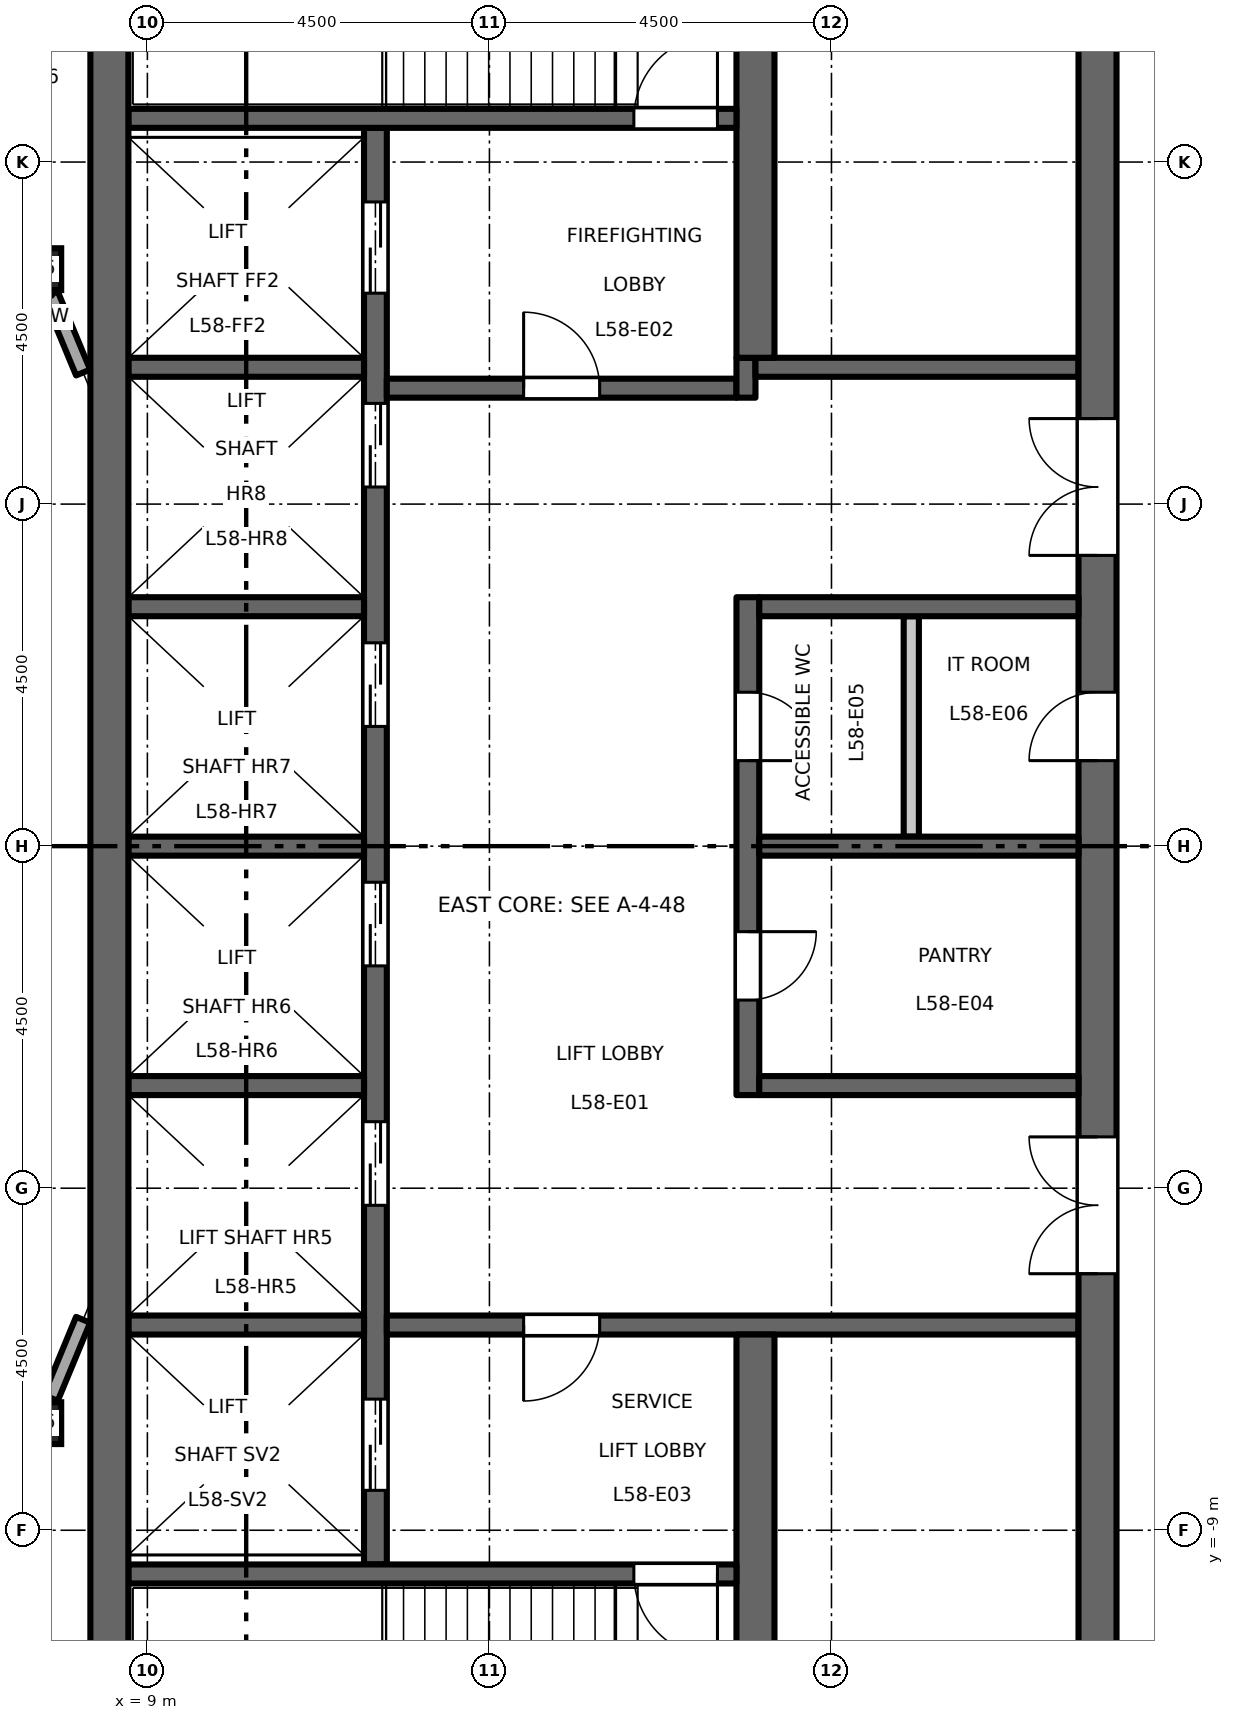
"""IFC4 building model, lengths in metres.
Left out: names, types, materials, properties, quantities, classifications, styles, units other than length and angle.
Written with IfcOpenShell. Run it as: python <this file> out.ifc"""

import sys

from ifc_helpers import new_model, si_unit, direction, frame, frame_2d, origin, origin_2d, place, context, subcontext, project, spatial, rectangle, hollow_rectangle, extrude, element, fill, save


model = new_model("IFC4")
c1 = context("Model", 3, precision=1e-05, world=origin(), true_north=direction((0.0, 1.0)))
c2 = subcontext(c1, "Body", "Model", "MODEL_VIEW")
j1 = project(units=[si_unit("LENGTHUNIT", "METRE"), si_unit("PLANEANGLEUNIT", "RADIAN")], contexts=[c1])
p1 = place(None, origin())
s1 = spatial("IfcSite", under=j1, at=p1, CompositionType="ELEMENT")
p2 = place(p1, origin())
s2 = spatial("IfcBuilding", under=s1, at=p2, CompositionType="ELEMENT")
p3 = place(p2, frame((0.0, 0.0, 269.2)))
s3 = spatial("IfcBuildingStorey", under=s2, at=p3, CompositionType="ELEMENT", Elevation=269.2)
for number, where, z_axis, x_axis in (
    (1, (7.591, -7.591, 0.0), (0.0, 0.0, 1.0), (1.0, 0.0, 0.0)),
    (2, (7.591, 7.591, 0.0), (0.0, 0.0, 1.0), (1.0, 0.0, 0.0)),
):
    element("IfcColumn", number, at=place(p3, frame(where, z_axis=z_axis, x_axis=x_axis)), inside=s3, PredefinedType="COLUMN", context=c2, shape_type="SweptSolid", body=[
        extrude(hollow_rectangle(XDim=0.55, YDim=0.55, WallThickness=0.028, at=origin_2d()), origin(), (0.0, 0.0, 1.0), 4.5),
    ])
p4 = place(p3, frame((12.0, -9.45, 0.0), z_axis=(0.0, 0.0, 1.0), x_axis=(0.0, 1.0, 0.0)))
e3 = element("IfcWall", 3, at=p4, inside=s3, PredefinedType="SHEAR", context=c2, shape_type="SweptSolid", body=[
    extrude(rectangle(XDim=18.9, YDim=0.3, at=frame_2d((9.45, 0.0))), origin(), (0.0, 0.0, 1.0), 4.35),
])
p5 = place(p4, frame((4.725, 0.0, 0.0)))
e4 = element("IfcOpeningElement", 4, at=p5, cuts=e3, PredefinedType="OPENING", context=c2, shape_type="SweptSolid", body=[
    extrude(rectangle(XDim=1.1, YDim=2.1, at=frame_2d((0.55, 1.05))), frame((0.0, 0.16, 0.0), z_axis=(0.0, -1.0, 0.0), x_axis=(1.0, 0.0, 0.0)), (0.0, 0.0, 1.0), 0.32),
])
p6 = place(p4, frame((7.875, 0.0, 0.0)))
e5 = element("IfcOpeningElement", 5, at=p6, cuts=e3, PredefinedType="OPENING", context=c2, shape_type="SweptSolid", body=[
    extrude(rectangle(XDim=1.1, YDim=2.1, at=frame_2d((0.55, 1.05))), frame((0.0, 0.16, 0.0), z_axis=(0.0, -1.0, 0.0), x_axis=(1.0, 0.0, 0.0)), (0.0, 0.0, 1.0), 0.32),
])
p7 = place(p4, frame((11.025, 0.0, 0.0)))
e6 = element("IfcOpeningElement", 6, at=p7, cuts=e3, PredefinedType="OPENING", context=c2, shape_type="SweptSolid", body=[
    extrude(rectangle(XDim=1.1, YDim=2.1, at=frame_2d((0.55, 1.05))), frame((0.0, 0.16, 0.0), z_axis=(0.0, -1.0, 0.0), x_axis=(1.0, 0.0, 0.0)), (0.0, 0.0, 1.0), 0.32),
])
p8 = place(p4, frame((14.175, 0.0, 0.0)))
e7 = element("IfcOpeningElement", 7, at=p8, cuts=e3, PredefinedType="OPENING", context=c2, shape_type="SweptSolid", body=[
    extrude(rectangle(XDim=1.1, YDim=2.1, at=frame_2d((0.55, 1.05))), frame((0.0, 0.16, 0.0), z_axis=(0.0, -1.0, 0.0), x_axis=(1.0, 0.0, 0.0)), (0.0, 0.0, 1.0), 0.32),
])
p9 = place(p4, frame((16.725, 0.0, 0.0)))
e8 = element("IfcOpeningElement", 8, at=p9, cuts=e3, PredefinedType="OPENING", context=c2, shape_type="SweptSolid", body=[
    extrude(rectangle(XDim=1.2, YDim=2.1, at=frame_2d((0.6, 1.05))), frame((0.0, 0.16, 0.0), z_axis=(0.0, -1.0, 0.0), x_axis=(1.0, 0.0, 0.0)), (0.0, 0.0, 1.0), 0.32),
])
p10 = place(p4, frame((0.975, 0.0, 0.0)))
e9 = element("IfcOpeningElement", 9, at=p10, cuts=e3, PredefinedType="OPENING", context=c2, shape_type="SweptSolid", body=[
    extrude(rectangle(XDim=1.2, YDim=2.1, at=frame_2d((0.6, 1.05))), frame((0.0, 0.16, 0.0), z_axis=(0.0, -1.0, 0.0), x_axis=(1.0, 0.0, 0.0)), (0.0, 0.0, 1.0), 0.32),
])
p11 = place(p3, frame((12.15, 6.025, 0.0), z_axis=(0.0, 0.0, 1.0), x_axis=(1.0, 0.0, 0.0)))
e10 = element("IfcWall", 10, at=p11, inside=s3, PredefinedType="SHEAR", context=c2, shape_type="SweptSolid", body=[
    extrude(rectangle(XDim=4.6, YDim=0.25, at=frame_2d((2.3, 0.0))), origin(), (0.0, 0.0, 1.0), 4.35),
])
p12 = place(p11, frame((1.8, 0.0, 0.0)))
e11 = element("IfcOpeningElement", 11, at=p12, cuts=e10, PredefinedType="OPENING", context=c2, shape_type="SweptSolid", body=[
    extrude(rectangle(XDim=1.0, YDim=2.1, at=frame_2d((0.5, 1.05))), frame((0.0, 0.135, 0.0), z_axis=(0.0, -1.0, 0.0), x_axis=(1.0, 0.0, 0.0)), (0.0, 0.0, 1.0), 0.27),
])
p13 = place(p3, frame((16.875, 5.9, 0.0), z_axis=(0.0, 0.0, 1.0), x_axis=(0.0, 1.0, 0.0)))
e12 = element("IfcWall", 12, at=p13, inside=s3, PredefinedType="SHEAR", context=c2, shape_type="SweptSolid", body=[
    extrude(rectangle(XDim=0.525, YDim=0.25, at=frame_2d((0.263, 0.0))), origin(), (0.0, 0.0, 1.0), 4.35),
])
p14 = place(p3, frame((17.0, 6.3, 0.0), z_axis=(0.0, 0.0, 1.0), x_axis=(1.0, 0.0, 0.0)))
e13 = element("IfcWall", 13, at=p14, inside=s3, PredefinedType="SHEAR", context=c2, shape_type="SweptSolid", body=[
    extrude(rectangle(XDim=4.25, YDim=0.25, at=frame_2d((2.125, 0.0))), origin(), (0.0, 0.0, 1.0), 4.35),
])
p15 = place(p3, frame((12.15, -6.3, 0.0), z_axis=(0.0, 0.0, 1.0), x_axis=(1.0, 0.0, 0.0)))
e14 = element("IfcWall", 14, at=p15, inside=s3, PredefinedType="SHEAR", context=c2, shape_type="SweptSolid", body=[
    extrude(rectangle(XDim=9.1, YDim=0.25, at=frame_2d((4.55, 0.0))), origin(), (0.0, 0.0, 1.0), 4.35),
])
p16 = place(p15, frame((1.8, 0.0, 0.0)))
e15 = element("IfcOpeningElement", 15, at=p16, cuts=e14, PredefinedType="OPENING", context=c2, shape_type="SweptSolid", body=[
    extrude(rectangle(XDim=1.0, YDim=2.1, at=frame_2d((0.5, 1.05))), frame((0.0, 0.135, 0.0), z_axis=(0.0, -1.0, 0.0), x_axis=(1.0, 0.0, 0.0)), (0.0, 0.0, 1.0), 0.27),
])
p17 = place(p3, frame((21.5, -13.0, 0.0), z_axis=(0.0, 0.0, 1.0), x_axis=(0.0, 1.0, 0.0)))
e16 = element("IfcWall", 16, at=p17, inside=s3, PredefinedType="SHEAR", context=c2, shape_type="SweptSolid", body=[
    extrude(rectangle(XDim=26.0, YDim=0.5, at=frame_2d((13.0, 0.0))), origin(), (0.0, 0.0, 1.0), 4.35),
])
p18 = place(p17, frame((16.825, 0.0, 0.0)))
e17 = element("IfcOpeningElement", 17, at=p18, cuts=e16, PredefinedType="OPENING", context=c2, shape_type="SweptSolid", body=[
    extrude(rectangle(XDim=1.8, YDim=2.1, at=frame_2d((0.9, 1.05))), frame((0.0, 0.26, 0.0), z_axis=(0.0, -1.0, 0.0), x_axis=(1.0, 0.0, 0.0)), (0.0, 0.0, 1.0), 0.52),
])
p19 = place(p17, frame((7.375, 0.0, 0.0)))
e18 = element("IfcOpeningElement", 18, at=p19, cuts=e16, PredefinedType="OPENING", context=c2, shape_type="SweptSolid", body=[
    extrude(rectangle(XDim=1.8, YDim=2.1, at=frame_2d((0.9, 1.05))), frame((0.0, 0.26, 0.0), z_axis=(0.0, -1.0, 0.0), x_axis=(1.0, 0.0, 0.0)), (0.0, 0.0, 1.0), 0.52),
])
p20 = place(p17, frame((14.125, 0.0, 0.0)))
e19 = element("IfcOpeningElement", 19, at=p20, cuts=e16, PredefinedType="OPENING", context=c2, shape_type="SweptSolid", body=[
    extrude(rectangle(XDim=0.9, YDim=2.1, at=frame_2d((0.45, 1.05))), frame((0.0, 0.26, 0.0), z_axis=(0.0, -1.0, 0.0), x_axis=(1.0, 0.0, 0.0)), (0.0, 0.0, 1.0), 0.52),
])
p21 = place(p3, frame((16.9, -3.275, 0.0), z_axis=(0.0, 0.0, 1.0), x_axis=(0.0, 1.0, 0.0)))
e20 = element("IfcWall", 20, at=p21, inside=s3, PredefinedType="SHEAR", context=c2, shape_type="SweptSolid", body=[
    extrude(rectangle(XDim=6.55, YDim=0.3, at=frame_2d((3.275, 0.0))), origin(), (0.0, 0.0, 1.0), 4.35),
])
p22 = place(p21, frame((1.25, 0.0, 0.0)))
e21 = element("IfcOpeningElement", 21, at=p22, cuts=e20, PredefinedType="OPENING", context=c2, shape_type="SweptSolid", body=[
    extrude(rectangle(XDim=0.9, YDim=2.1, at=frame_2d((0.45, 1.05))), frame((0.0, 0.16, 0.0), z_axis=(0.0, -1.0, 0.0), x_axis=(1.0, 0.0, 0.0)), (0.0, 0.0, 1.0), 0.32),
])
p23 = place(p21, frame((4.4, 0.0, 0.0)))
e22 = element("IfcOpeningElement", 22, at=p23, cuts=e20, PredefinedType="OPENING", context=c2, shape_type="SweptSolid", body=[
    extrude(rectangle(XDim=0.9, YDim=2.1, at=frame_2d((0.45, 1.05))), frame((0.0, 0.16, 0.0), z_axis=(0.0, -1.0, 0.0), x_axis=(1.0, 0.0, 0.0)), (0.0, 0.0, 1.0), 0.32),
])
for number, where, z_axis, x_axis in (
    (23, (17.05, 0.0, 0.0), (0.0, 0.0, 1.0), (1.0, 0.0, 0.0)),
    (24, (17.05, 3.15, 0.0), (0.0, 0.0, 1.0), (1.0, 0.0, 0.0)),
    (25, (17.05, -3.15, 0.0), (0.0, 0.0, 1.0), (1.0, 0.0, 0.0)),
):
    element("IfcWall", number, at=place(p3, frame(where, z_axis=z_axis, x_axis=x_axis)), inside=s3, PredefinedType="SHEAR", context=c2, shape_type="SweptSolid", body=[
        extrude(rectangle(XDim=4.2, YDim=0.25, at=frame_2d((2.1, 0.0))), origin(), (0.0, 0.0, 1.0), 4.35),
    ])
p24 = place(p3, frame((19.05, 0.125, 0.0), z_axis=(0.0, 0.0, 1.0), x_axis=(0.0, 1.0, 0.0)))
e26 = element("IfcWall", 26, at=p24, inside=s3, PredefinedType="PARTITIONING", context=c2, shape_type="SweptSolid", body=[
    extrude(rectangle(XDim=2.9, YDim=0.2, at=frame_2d((1.45, 0.0))), origin(), (0.0, 0.0, 1.0), 4.35),
])
for number, where, z_axis, x_axis in (
    (27, (17.0, 6.425, 0.0), (0.0, 0.0, 1.0), (0.0, 1.0, 0.0)),
    (28, (17.0, -13.0, 0.0), (0.0, 0.0, 1.0), (0.0, 1.0, 0.0)),
):
    element("IfcWall", number, at=place(p3, frame(where, z_axis=z_axis, x_axis=x_axis)), inside=s3, PredefinedType="SHEAR", context=c2, shape_type="SweptSolid", body=[
        extrude(rectangle(XDim=6.575, YDim=0.5, at=frame_2d((3.288, 0.0))), origin(), (0.0, 0.0, 1.0), 4.35),
    ])
for number, where, z_axis, x_axis in (
    (29, (8.75, 0.0, 0.0), (0.0, 0.0, 1.0), (1.0, 0.0, 0.0)),
    (30, (8.75, 3.15, 0.0), (0.0, 0.0, 1.0), (1.0, 0.0, 0.0)),
    (31, (8.75, 6.3, 0.0), (0.0, 0.0, 1.0), (1.0, 0.0, 0.0)),
    (32, (8.75, -3.15, 0.0), (0.0, 0.0, 1.0), (1.0, 0.0, 0.0)),
    (33, (8.75, -6.3, 0.0), (0.0, 0.0, 1.0), (1.0, 0.0, 0.0)),
):
    element("IfcWall", number, at=place(p3, frame(where, z_axis=z_axis, x_axis=x_axis)), inside=s3, PredefinedType="SHEAR", context=c2, shape_type="SweptSolid", body=[
        extrude(rectangle(XDim=3.1, YDim=0.25, at=frame_2d((1.55, 0.0))), origin(), (0.0, 0.0, 1.0), 4.35),
    ])
p25 = place(p3, frame((8.75, 9.575, 0.0), z_axis=(0.0, 0.0, 1.0), x_axis=(1.0, 0.0, 0.0)))
e34 = element("IfcWall", 34, at=p25, inside=s3, PredefinedType="SHEAR", context=c2, shape_type="SweptSolid", body=[
    extrude(rectangle(XDim=8.0, YDim=0.25, at=frame_2d((4.0, 0.0))), origin(), (0.0, 0.0, 1.0), 4.35),
])
p26 = place(p25, frame((6.65, 0.0, 0.0)))
e35 = element("IfcOpeningElement", 35, at=p26, cuts=e34, PredefinedType="OPENING", context=c2, shape_type="SweptSolid", body=[
    extrude(rectangle(XDim=1.1, YDim=2.1, at=frame_2d((0.55, 1.05))), frame((0.0, 0.135, 0.0), z_axis=(0.0, -1.0, 0.0), x_axis=(1.0, 0.0, 0.0)), (0.0, 0.0, 1.0), 0.27),
])
p27 = place(p3, frame((8.75, -9.575, 0.0), z_axis=(0.0, 0.0, 1.0), x_axis=(1.0, 0.0, 0.0)))
e36 = element("IfcWall", 36, at=p27, inside=s3, PredefinedType="SHEAR", context=c2, shape_type="SweptSolid", body=[
    extrude(rectangle(XDim=8.0, YDim=0.25, at=frame_2d((4.0, 0.0))), origin(), (0.0, 0.0, 1.0), 4.35),
])
p28 = place(p27, frame((6.65, 0.0, 0.0)))
e37 = element("IfcOpeningElement", 37, at=p28, cuts=e36, PredefinedType="OPENING", context=c2, shape_type="SweptSolid", body=[
    extrude(rectangle(XDim=1.1, YDim=2.1, at=frame_2d((0.55, 1.05))), frame((0.0, 0.135, 0.0), z_axis=(0.0, -1.0, 0.0), x_axis=(1.0, 0.0, 0.0)), (0.0, 0.0, 1.0), 0.27),
])
p29 = place(p3, frame((8.5, -13.0, 0.0), z_axis=(0.0, 0.0, 1.0), x_axis=(0.0, 1.0, 0.0)))
e38 = element("IfcWall", 38, at=p29, inside=s3, PredefinedType="SHEAR", context=c2, shape_type="SweptSolid", body=[
    extrude(rectangle(XDim=26.0, YDim=0.5, at=frame_2d((13.0, 0.0))), origin(), (0.0, 0.0, 1.0), 4.35),
])
for number, where, z_axis, x_axis in (
    (39, (7.729, -7.259, 0.0), (0.0, 0.0, 1.0), (0.383, 0.924, 0.0)),
    (40, (8.154, 6.231, 0.0), (0.0, 0.0, 1.0), (-0.383, 0.924, 0.0)),
):
    element("IfcWall", number, at=place(p3, frame(where, z_axis=z_axis, x_axis=x_axis)), inside=s3, PredefinedType="STANDARD", context=c2, shape_type="SweptSolid", body=[
        extrude(rectangle(XDim=1.113, YDim=0.2, at=frame_2d((0.556, 0.0))), origin(), (0.0, 0.0, 1.0), 3.918),
    ])
p30 = place(p12, origin())
e41 = element("IfcDoor", 41, at=p30, inside=s3, OperationType="SINGLE_SWING_RIGHT", PredefinedType="DOOR", context=c2, shape_type="SweptSolid", body=[
    extrude(rectangle(XDim=1.0, YDim=2.1, at=frame_2d((0.5, 1.05))), frame((0.0, 0.025, 0.0), z_axis=(0.0, -1.0, 0.0), x_axis=(1.0, 0.0, 0.0)), (0.0, 0.0, 1.0), 0.05),
])
fill(e11, e41)
p31 = place(p16, origin())
e42 = element("IfcDoor", 42, at=p31, inside=s3, OperationType="SINGLE_SWING_LEFT", PredefinedType="DOOR", context=c2, shape_type="SweptSolid", body=[
    extrude(rectangle(XDim=1.0, YDim=2.1, at=frame_2d((0.5, 1.05))), frame((0.0, 0.025, 0.0), z_axis=(0.0, -1.0, 0.0), x_axis=(1.0, 0.0, 0.0)), (0.0, 0.0, 1.0), 0.05),
])
fill(e15, e42)
p32 = place(p26, origin())
e43 = element("IfcDoor", 43, at=p32, inside=s3, OperationType="SINGLE_SWING_LEFT", PredefinedType="DOOR", context=c2, shape_type="SweptSolid", body=[
    extrude(rectangle(XDim=1.1, YDim=2.1, at=frame_2d((0.55, 1.05))), frame((0.0, 0.025, 0.0), z_axis=(0.0, -1.0, 0.0), x_axis=(1.0, 0.0, 0.0)), (0.0, 0.0, 1.0), 0.05),
])
fill(e35, e43)
p33 = place(p28, origin())
e44 = element("IfcDoor", 44, at=p33, inside=s3, OperationType="SINGLE_SWING_RIGHT", PredefinedType="DOOR", context=c2, shape_type="SweptSolid", body=[
    extrude(rectangle(XDim=1.1, YDim=2.1, at=frame_2d((0.55, 1.05))), frame((0.0, 0.025, 0.0), z_axis=(0.0, -1.0, 0.0), x_axis=(1.0, 0.0, 0.0)), (0.0, 0.0, 1.0), 0.05),
])
fill(e37, e44)
p34 = place(p18, origin())
e45 = element("IfcDoor", 45, at=p34, inside=s3, OperationType="DOUBLE_DOOR_DOUBLE_SWING", PredefinedType="DOOR", context=c2, shape_type="SweptSolid", body=[
    extrude(rectangle(XDim=1.8, YDim=2.1, at=frame_2d((0.9, 1.05))), frame((0.0, 0.025, 0.0), z_axis=(0.0, -1.0, 0.0), x_axis=(1.0, 0.0, 0.0)), (0.0, 0.0, 1.0), 0.05),
])
fill(e17, e45)
p35 = place(p19, origin())
e46 = element("IfcDoor", 46, at=p35, inside=s3, OperationType="DOUBLE_DOOR_DOUBLE_SWING", PredefinedType="DOOR", context=c2, shape_type="SweptSolid", body=[
    extrude(rectangle(XDim=1.8, YDim=2.1, at=frame_2d((0.9, 1.05))), frame((0.0, 0.025, 0.0), z_axis=(0.0, -1.0, 0.0), x_axis=(1.0, 0.0, 0.0)), (0.0, 0.0, 1.0), 0.05),
])
fill(e18, e46)
p36 = place(p5, origin())
e47 = element("IfcDoor", 47, at=p36, inside=s3, OperationType="DOUBLE_DOOR_SLIDING", PredefinedType="DOOR", context=c2, shape_type="SweptSolid", body=[
    extrude(rectangle(XDim=1.1, YDim=2.1, at=frame_2d((0.55, 1.05))), frame((0.0, 0.025, 0.0), z_axis=(0.0, -1.0, 0.0), x_axis=(1.0, 0.0, 0.0)), (0.0, 0.0, 1.0), 0.05),
])
fill(e4, e47)
p37 = place(p6, origin())
e48 = element("IfcDoor", 48, at=p37, inside=s3, OperationType="DOUBLE_DOOR_SLIDING", PredefinedType="DOOR", context=c2, shape_type="SweptSolid", body=[
    extrude(rectangle(XDim=1.1, YDim=2.1, at=frame_2d((0.55, 1.05))), frame((0.0, 0.025, 0.0), z_axis=(0.0, -1.0, 0.0), x_axis=(1.0, 0.0, 0.0)), (0.0, 0.0, 1.0), 0.05),
])
fill(e5, e48)
p38 = place(p7, origin())
e49 = element("IfcDoor", 49, at=p38, inside=s3, OperationType="DOUBLE_DOOR_SLIDING", PredefinedType="DOOR", context=c2, shape_type="SweptSolid", body=[
    extrude(rectangle(XDim=1.1, YDim=2.1, at=frame_2d((0.55, 1.05))), frame((0.0, 0.025, 0.0), z_axis=(0.0, -1.0, 0.0), x_axis=(1.0, 0.0, 0.0)), (0.0, 0.0, 1.0), 0.05),
])
fill(e6, e49)
p39 = place(p8, origin())
e50 = element("IfcDoor", 50, at=p39, inside=s3, OperationType="DOUBLE_DOOR_SLIDING", PredefinedType="DOOR", context=c2, shape_type="SweptSolid", body=[
    extrude(rectangle(XDim=1.1, YDim=2.1, at=frame_2d((0.55, 1.05))), frame((0.0, 0.025, 0.0), z_axis=(0.0, -1.0, 0.0), x_axis=(1.0, 0.0, 0.0)), (0.0, 0.0, 1.0), 0.05),
])
fill(e7, e50)
p40 = place(p9, origin())
e51 = element("IfcDoor", 51, at=p40, inside=s3, OperationType="DOUBLE_DOOR_SLIDING", PredefinedType="DOOR", context=c2, shape_type="SweptSolid", body=[
    extrude(rectangle(XDim=1.2, YDim=2.1, at=frame_2d((0.6, 1.05))), frame((0.0, 0.025, 0.0), z_axis=(0.0, -1.0, 0.0), x_axis=(1.0, 0.0, 0.0)), (0.0, 0.0, 1.0), 0.05),
])
fill(e8, e51)
p41 = place(p10, origin())
e52 = element("IfcDoor", 52, at=p41, inside=s3, OperationType="DOUBLE_DOOR_SLIDING", PredefinedType="DOOR", context=c2, shape_type="SweptSolid", body=[
    extrude(rectangle(XDim=1.2, YDim=2.1, at=frame_2d((0.6, 1.05))), frame((0.0, 0.025, 0.0), z_axis=(0.0, -1.0, 0.0), x_axis=(1.0, 0.0, 0.0)), (0.0, 0.0, 1.0), 0.05),
])
fill(e9, e52)
p42 = place(p22, origin())
e53 = element("IfcDoor", 53, at=p42, inside=s3, OperationType="SINGLE_SWING_RIGHT", PredefinedType="DOOR", context=c2, shape_type="SweptSolid", body=[
    extrude(rectangle(XDim=0.9, YDim=2.1, at=frame_2d((0.45, 1.05))), frame((0.0, 0.025, 0.0), z_axis=(0.0, -1.0, 0.0), x_axis=(1.0, 0.0, 0.0)), (0.0, 0.0, 1.0), 0.05),
])
fill(e21, e53)
p43 = place(p23, origin())
e54 = element("IfcDoor", 54, at=p43, inside=s3, OperationType="SINGLE_SWING_LEFT", PredefinedType="DOOR", context=c2, shape_type="SweptSolid", body=[
    extrude(rectangle(XDim=0.9, YDim=2.1, at=frame_2d((0.45, 1.05))), frame((0.0, 0.025, 0.0), z_axis=(0.0, -1.0, 0.0), x_axis=(1.0, 0.0, 0.0)), (0.0, 0.0, 1.0), 0.05),
])
fill(e22, e54)
p44 = place(p20, origin())
e55 = element("IfcDoor", 55, at=p44, inside=s3, OperationType="SINGLE_SWING_RIGHT", PredefinedType="DOOR", context=c2, shape_type="SweptSolid", body=[
    extrude(rectangle(XDim=0.9, YDim=2.1, at=frame_2d((0.45, 1.05))), frame((0.0, 0.025, 0.0), z_axis=(0.0, -1.0, 0.0), x_axis=(1.0, 0.0, 0.0)), (0.0, 0.0, 1.0), 0.05),
])
fill(e19, e55)
save(model, sys.argv[1])
